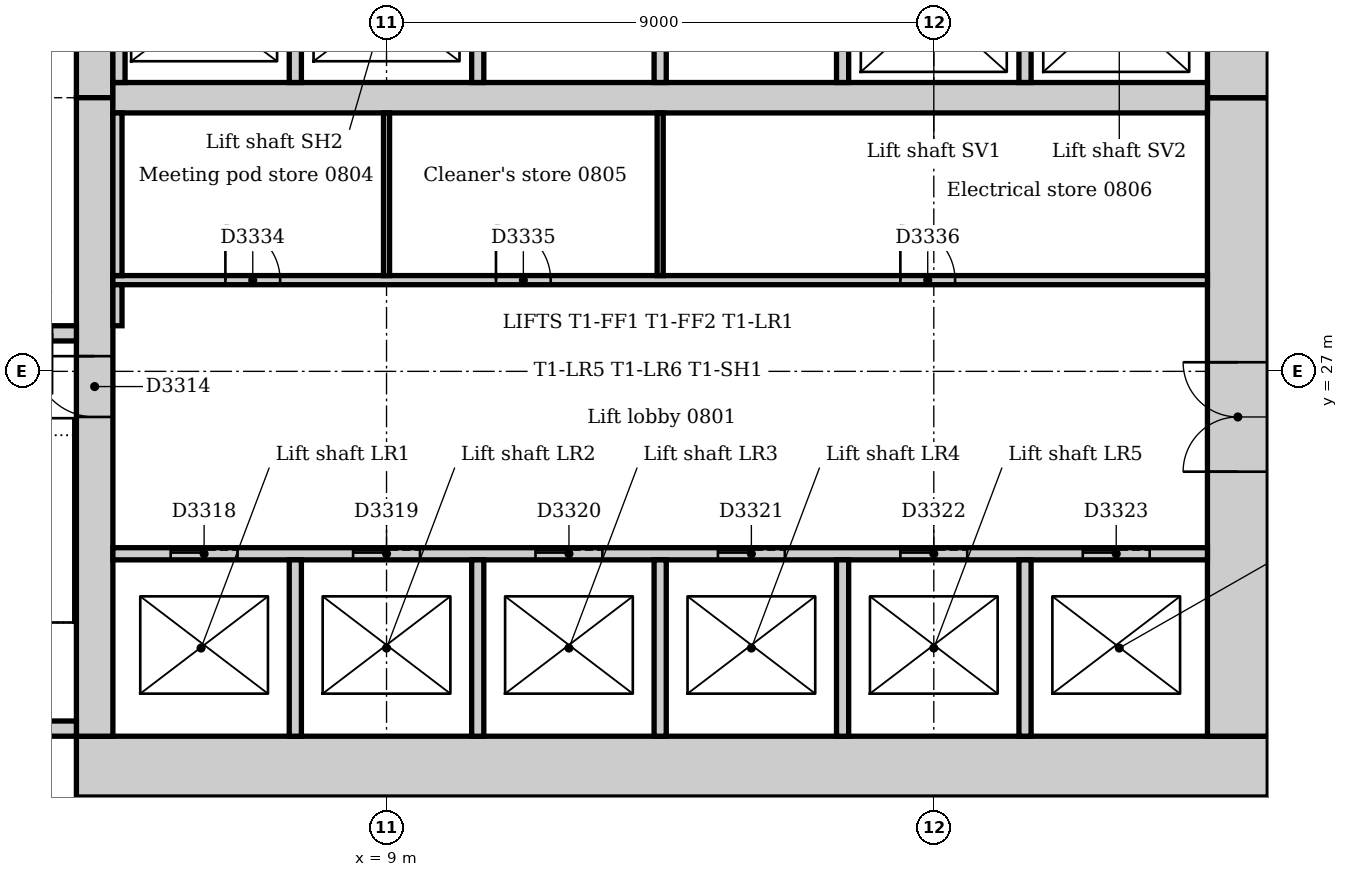
"""IFC4 building model, lengths in metres.
Left out: names, types, materials, properties, quantities, classifications, styles, units other than length and angle.
Written with IfcOpenShell. Run it as: python <this file> out.ifc"""

import sys

from ifc_helpers import new_model, si_unit, direction, frame, frame_2d, origin, place, context, subcontext, project, spatial, rectangle, extrude, element, fill, save


model = new_model("IFC4")
c1 = context("Model", 3, precision=1e-05, world=origin(), true_north=direction((0.0, 1.0)))
c2 = subcontext(c1, "Body", "Model", "MODEL_VIEW")
j1 = project(units=[si_unit("LENGTHUNIT", "METRE"), si_unit("PLANEANGLEUNIT", "RADIAN")], contexts=[c1])
p1 = place(None, origin())
s1 = spatial("IfcSite", under=j1, at=p1, CompositionType="ELEMENT")
p2 = place(p1, origin())
s2 = spatial("IfcBuilding", under=s1, at=p2, CompositionType="ELEMENT")
p3 = place(p2, frame((0.0, 0.0, 38.0)))
s3 = spatial("IfcBuildingStorey", under=s2, at=p3, CompositionType="ELEMENT", Elevation=38.0)
p4 = place(p3, frame((3.9, 20.5, 0.0), z_axis=(0.0, 0.0, 1.0), x_axis=(1.0, 0.0, 0.0)))
e1 = element("IfcWall", 1, at=p4, inside=s3, PredefinedType="SOLIDWALL", context=c2, shape_type="SweptSolid", body=[
    extrude(rectangle(XDim=19.6, YDim=1.0, at=frame_2d((9.8, 0.0))), origin(), (0.0, 0.0, 1.0), 4.0),
])
p5 = place(p3, frame((23.0, 21.0, 0.0), z_axis=(0.0, 0.0, 1.0), x_axis=(0.0, 1.0, 0.0)))
e2 = element("IfcWall", 2, at=p5, inside=s3, PredefinedType="SOLIDWALL", context=c2, shape_type="SweptSolid", body=[
    extrude(rectangle(XDim=10.5, YDim=1.0, at=frame_2d((5.25, 0.0))), origin(), (0.0, 0.0, 1.0), 4.0),
])
p6 = place(p5, frame((4.35, 0.0, 0.0)))
e3 = element("IfcOpeningElement", 3, at=p6, cuts=e2, PredefinedType="OPENING", context=c2, shape_type="SweptSolid", body=[
    extrude(rectangle(XDim=1.8, YDim=2.1, at=frame_2d((0.9, 1.05))), frame((0.0, 0.51, 0.0), z_axis=(0.0, -1.0, 0.0), x_axis=(1.0, 0.0, 0.0)), (0.0, 0.0, 1.0), 1.02),
])
p7 = place(p3, frame((23.0, 31.5, 0.0), z_axis=(0.0, 0.0, 1.0), x_axis=(0.0, 1.0, 0.0)))
e4 = element("IfcWall", 4, at=p7, inside=s3, PredefinedType="SOLIDWALL", context=c2, shape_type="SweptSolid", body=[
    extrude(rectangle(XDim=10.5, YDim=1.0, at=frame_2d((5.25, 0.0))), origin(), (0.0, 0.0, 1.0), 4.0),
])
p8 = place(p7, frame((3.15, 0.0, 0.0)))
e5 = element("IfcOpeningElement", 5, at=p8, cuts=e4, PredefinedType="OPENING", context=c2, shape_type="SweptSolid", body=[
    extrude(rectangle(XDim=1.0, YDim=2.1, at=frame_2d((0.5, 1.05))), frame((0.0, 0.51, 0.0), z_axis=(0.0, -1.0, 0.0), x_axis=(1.0, 0.0, 0.0)), (0.0, 0.0, 1.0), 1.02),
])
p9 = place(p7, frame((5.2, 0.0, 0.0)))
e6 = element("IfcOpeningElement", 6, at=p9, cuts=e4, PredefinedType="OPENING", context=c2, shape_type="SweptSolid", body=[
    extrude(rectangle(XDim=1.0, YDim=2.1, at=frame_2d((0.5, 1.05))), frame((0.0, 0.51, 0.0), z_axis=(0.0, -1.0, 0.0), x_axis=(1.0, 0.0, 0.0)), (0.0, 0.0, 1.0), 1.02),
])
p10 = place(p3, frame((4.2, 42.0, 0.0), z_axis=(0.0, 0.0, 1.0), x_axis=(0.0, -1.0, 0.0)))
e7 = element("IfcWall", 7, at=p10, inside=s3, PredefinedType="SOLIDWALL", context=c2, shape_type="SweptSolid", body=[
    extrude(rectangle(XDim=10.5, YDim=0.6, at=frame_2d((5.25, 0.0))), origin(), (0.0, 0.0, 1.0), 4.0),
])
p11 = place(p10, frame((5.3, 0.0, 0.0)))
e8 = element("IfcOpeningElement", 8, at=p11, cuts=e7, PredefinedType="OPENING", context=c2, shape_type="SweptSolid", body=[
    extrude(rectangle(XDim=1.0, YDim=2.1, at=frame_2d((0.5, 1.05))), frame((0.0, 0.31, 0.0), z_axis=(0.0, -1.0, 0.0), x_axis=(1.0, 0.0, 0.0)), (0.0, 0.0, 1.0), 0.62),
])
p12 = place(p3, frame((4.2, 31.5, 0.0), z_axis=(0.0, 0.0, 1.0), x_axis=(0.0, -1.0, 0.0)))
e9 = element("IfcWall", 9, at=p12, inside=s3, PredefinedType="SOLIDWALL", context=c2, shape_type="SweptSolid", body=[
    extrude(rectangle(XDim=10.5, YDim=0.6, at=frame_2d((5.25, 0.0))), origin(), (0.0, 0.0, 1.0), 4.0),
])
p13 = place(p12, frame((4.25, 0.0, 0.0)))
e10 = element("IfcOpeningElement", 10, at=p13, cuts=e9, PredefinedType="OPENING", context=c2, shape_type="SweptSolid", body=[
    extrude(rectangle(XDim=1.0, YDim=2.1, at=frame_2d((0.5, 1.05))), frame((0.0, 0.31, 0.0), z_axis=(0.0, -1.0, 0.0), x_axis=(1.0, 0.0, 0.0)), (0.0, 0.0, 1.0), 0.62),
])
p14 = place(p3, frame((4.5, 31.5, 0.0), z_axis=(0.0, 0.0, 1.0), x_axis=(1.0, 0.0, 0.0)))
e11 = element("IfcWall", 11, at=p14, inside=s3, PredefinedType="SOLIDWALL", context=c2, shape_type="SweptSolid", body=[
    extrude(rectangle(XDim=18.0, YDim=0.5, at=frame_2d((9.0, 0.0))), origin(), (0.0, 0.0, 1.0), 4.0),
])
p15 = place(p3, frame((0.36, 21.125, 0.0), z_axis=(0.0, 0.0, 1.0), x_axis=(1.0, 0.0, 0.0)))
e12 = element("IfcWall", 12, at=p15, inside=s3, PredefinedType="SOLIDWALL", context=c2, shape_type="SweptSolid", body=[
    extrude(rectangle(XDim=3.54, YDim=0.25, at=frame_2d((1.77, 0.0))), origin(), (0.0, 0.0, 1.0), 4.0),
])
p16 = place(p3, frame((3.9, 27.625, 0.0), z_axis=(0.0, 0.0, 1.0), x_axis=(-1.0, 0.0, 0.0)))
e13 = element("IfcWall", 13, at=p16, inside=s3, PredefinedType="SOLIDWALL", context=c2, shape_type="SweptSolid", body=[
    extrude(rectangle(XDim=3.54, YDim=0.25, at=frame_2d((1.77, 0.0))), origin(), (0.0, 0.0, 1.0), 4.0),
])
p17 = place(p16, frame((0.4, 0.0, 0.0)))
e14 = element("IfcOpeningElement", 14, at=p17, cuts=e13, PredefinedType="OPENING", context=c2, shape_type="SweptSolid", body=[
    extrude(rectangle(XDim=1.0, YDim=2.1, at=frame_2d((0.5, 1.05))), frame((0.0, 0.135, 0.0), z_axis=(0.0, -1.0, 0.0), x_axis=(1.0, 0.0, 0.0)), (0.0, 0.0, 1.0), 0.27),
])
p18 = place(p3, frame((4.5, 24.0, 0.0), z_axis=(0.0, 0.0, 1.0), x_axis=(1.0, 0.0, 0.0)))
e15 = element("IfcWall", 15, at=p18, inside=s3, PredefinedType="PARTITIONING", context=c2, shape_type="SweptSolid", body=[
    extrude(rectangle(XDim=18.0, YDim=0.2, at=frame_2d((9.0, 0.0))), origin(), (0.0, 0.0, 1.0), 3.85),
])
p19 = place(p18, frame((0.95, 0.0, 0.0)))
e16 = element("IfcOpeningElement", 16, at=p19, cuts=e15, PredefinedType="OPENING", context=c2, shape_type="SweptSolid", body=[
    extrude(rectangle(XDim=1.1, YDim=2.1, at=frame_2d((0.55, 1.05))), frame((0.0, 0.11, 0.0), z_axis=(0.0, -1.0, 0.0), x_axis=(1.0, 0.0, 0.0)), (0.0, 0.0, 1.0), 0.22),
])
p20 = place(p18, frame((3.95, 0.0, 0.0)))
e17 = element("IfcOpeningElement", 17, at=p20, cuts=e15, PredefinedType="OPENING", context=c2, shape_type="SweptSolid", body=[
    extrude(rectangle(XDim=1.1, YDim=2.1, at=frame_2d((0.55, 1.05))), frame((0.0, 0.11, 0.0), z_axis=(0.0, -1.0, 0.0), x_axis=(1.0, 0.0, 0.0)), (0.0, 0.0, 1.0), 0.22),
])
p21 = place(p18, frame((6.95, 0.0, 0.0)))
e18 = element("IfcOpeningElement", 18, at=p21, cuts=e15, PredefinedType="OPENING", context=c2, shape_type="SweptSolid", body=[
    extrude(rectangle(XDim=1.1, YDim=2.1, at=frame_2d((0.55, 1.05))), frame((0.0, 0.11, 0.0), z_axis=(0.0, -1.0, 0.0), x_axis=(1.0, 0.0, 0.0)), (0.0, 0.0, 1.0), 0.22),
])
p22 = place(p18, frame((9.95, 0.0, 0.0)))
e19 = element("IfcOpeningElement", 19, at=p22, cuts=e15, PredefinedType="OPENING", context=c2, shape_type="SweptSolid", body=[
    extrude(rectangle(XDim=1.1, YDim=2.1, at=frame_2d((0.55, 1.05))), frame((0.0, 0.11, 0.0), z_axis=(0.0, -1.0, 0.0), x_axis=(1.0, 0.0, 0.0)), (0.0, 0.0, 1.0), 0.22),
])
p23 = place(p18, frame((12.95, 0.0, 0.0)))
e20 = element("IfcOpeningElement", 20, at=p23, cuts=e15, PredefinedType="OPENING", context=c2, shape_type="SweptSolid", body=[
    extrude(rectangle(XDim=1.1, YDim=2.1, at=frame_2d((0.55, 1.05))), frame((0.0, 0.11, 0.0), z_axis=(0.0, -1.0, 0.0), x_axis=(1.0, 0.0, 0.0)), (0.0, 0.0, 1.0), 0.22),
])
p24 = place(p18, frame((15.95, 0.0, 0.0)))
e21 = element("IfcOpeningElement", 21, at=p24, cuts=e15, PredefinedType="OPENING", context=c2, shape_type="SweptSolid", body=[
    extrude(rectangle(XDim=1.1, YDim=2.1, at=frame_2d((0.55, 1.05))), frame((0.0, 0.11, 0.0), z_axis=(0.0, -1.0, 0.0), x_axis=(1.0, 0.0, 0.0)), (0.0, 0.0, 1.0), 0.22),
])
p25 = place(p3, frame((4.6, 31.75, 0.0), z_axis=(0.0, 0.0, 1.0), x_axis=(0.0, 1.0, 0.0)))
e22 = element("IfcWall", 22, at=p25, inside=s3, PredefinedType="PARTITIONING", context=c2, shape_type="SweptSolid", body=[
    extrude(rectangle(XDim=2.65, YDim=0.2, at=frame_2d((1.325, 0.0))), origin(), (0.0, 0.0, 1.0), 3.85),
])
p26 = place(p3, frame((7.5, 21.0, 0.0), z_axis=(0.0, 0.0, 1.0), x_axis=(0.0, 1.0, 0.0)))
e23 = element("IfcWall", 23, at=p26, inside=s3, PredefinedType="PARTITIONING", context=c2, shape_type="SweptSolid", body=[
    extrude(rectangle(XDim=2.9, YDim=0.2, at=frame_2d((1.45, 0.0))), origin(), (0.0, 0.0, 1.0), 3.85),
])
p27 = place(p3, frame((7.5, 31.75, 0.0), z_axis=(0.0, 0.0, 1.0), x_axis=(0.0, 1.0, 0.0)))
e24 = element("IfcWall", 24, at=p27, inside=s3, PredefinedType="PARTITIONING", context=c2, shape_type="SweptSolid", body=[
    extrude(rectangle(XDim=2.65, YDim=0.2, at=frame_2d((1.325, 0.0))), origin(), (0.0, 0.0, 1.0), 3.85),
])
p28 = place(p3, frame((10.5, 21.0, 0.0), z_axis=(0.0, 0.0, 1.0), x_axis=(0.0, 1.0, 0.0)))
e25 = element("IfcWall", 25, at=p28, inside=s3, PredefinedType="PARTITIONING", context=c2, shape_type="SweptSolid", body=[
    extrude(rectangle(XDim=2.9, YDim=0.2, at=frame_2d((1.45, 0.0))), origin(), (0.0, 0.0, 1.0), 3.85),
])
p29 = place(p3, frame((10.5, 31.75, 0.0), z_axis=(0.0, 0.0, 1.0), x_axis=(0.0, 1.0, 0.0)))
e26 = element("IfcWall", 26, at=p29, inside=s3, PredefinedType="PARTITIONING", context=c2, shape_type="SweptSolid", body=[
    extrude(rectangle(XDim=2.65, YDim=0.2, at=frame_2d((1.325, 0.0))), origin(), (0.0, 0.0, 1.0), 3.85),
])
p30 = place(p3, frame((13.5, 21.0, 0.0), z_axis=(0.0, 0.0, 1.0), x_axis=(0.0, 1.0, 0.0)))
e27 = element("IfcWall", 27, at=p30, inside=s3, PredefinedType="PARTITIONING", context=c2, shape_type="SweptSolid", body=[
    extrude(rectangle(XDim=2.9, YDim=0.2, at=frame_2d((1.45, 0.0))), origin(), (0.0, 0.0, 1.0), 3.85),
])
p31 = place(p3, frame((13.5, 31.75, 0.0), z_axis=(0.0, 0.0, 1.0), x_axis=(0.0, 1.0, 0.0)))
e28 = element("IfcWall", 28, at=p31, inside=s3, PredefinedType="PARTITIONING", context=c2, shape_type="SweptSolid", body=[
    extrude(rectangle(XDim=2.65, YDim=0.2, at=frame_2d((1.325, 0.0))), origin(), (0.0, 0.0, 1.0), 3.85),
])
p32 = place(p3, frame((16.5, 21.0, 0.0), z_axis=(0.0, 0.0, 1.0), x_axis=(0.0, 1.0, 0.0)))
e29 = element("IfcWall", 29, at=p32, inside=s3, PredefinedType="PARTITIONING", context=c2, shape_type="SweptSolid", body=[
    extrude(rectangle(XDim=2.9, YDim=0.2, at=frame_2d((1.45, 0.0))), origin(), (0.0, 0.0, 1.0), 3.85),
])
p33 = place(p3, frame((16.5, 31.75, 0.0), z_axis=(0.0, 0.0, 1.0), x_axis=(0.0, 1.0, 0.0)))
e30 = element("IfcWall", 30, at=p33, inside=s3, PredefinedType="PARTITIONING", context=c2, shape_type="SweptSolid", body=[
    extrude(rectangle(XDim=2.65, YDim=0.2, at=frame_2d((1.325, 0.0))), origin(), (0.0, 0.0, 1.0), 3.85),
])
p34 = place(p3, frame((19.5, 21.0, 0.0), z_axis=(0.0, 0.0, 1.0), x_axis=(0.0, 1.0, 0.0)))
e31 = element("IfcWall", 31, at=p34, inside=s3, PredefinedType="PARTITIONING", context=c2, shape_type="SweptSolid", body=[
    extrude(rectangle(XDim=2.9, YDim=0.2, at=frame_2d((1.45, 0.0))), origin(), (0.0, 0.0, 1.0), 3.85),
])
p35 = place(p3, frame((19.5, 31.75, 0.0), z_axis=(0.0, 0.0, 1.0), x_axis=(0.0, 1.0, 0.0)))
e32 = element("IfcWall", 32, at=p35, inside=s3, PredefinedType="PARTITIONING", context=c2, shape_type="SweptSolid", body=[
    extrude(rectangle(XDim=2.65, YDim=0.2, at=frame_2d((1.325, 0.0))), origin(), (0.0, 0.0, 1.0), 3.85),
])
p36 = place(p3, frame((4.5, 28.5, 0.0), z_axis=(0.0, 0.0, 1.0), x_axis=(1.0, 0.0, 0.0)))
e33 = element("IfcWall", 33, at=p36, inside=s3, PredefinedType="PARTITIONING", context=c2, shape_type="SweptSolid", body=[
    extrude(rectangle(XDim=18.0, YDim=0.15, at=frame_2d((9.0, 0.0))), origin(), (0.0, 0.0, 1.0), 3.85),
])
p37 = place(p36, frame((1.85, 0.0, 0.0)))
e34 = element("IfcOpeningElement", 34, at=p37, cuts=e33, PredefinedType="OPENING", context=c2, shape_type="SweptSolid", body=[
    extrude(rectangle(XDim=0.9, YDim=2.1, at=frame_2d((0.45, 1.05))), frame((0.0, 0.085, 0.0), z_axis=(0.0, -1.0, 0.0), x_axis=(1.0, 0.0, 0.0)), (0.0, 0.0, 1.0), 0.17),
])
p38 = place(p36, frame((6.3, 0.0, 0.0)))
e35 = element("IfcOpeningElement", 35, at=p38, cuts=e33, PredefinedType="OPENING", context=c2, shape_type="SweptSolid", body=[
    extrude(rectangle(XDim=0.9, YDim=2.1, at=frame_2d((0.45, 1.05))), frame((0.0, 0.085, 0.0), z_axis=(0.0, -1.0, 0.0), x_axis=(1.0, 0.0, 0.0)), (0.0, 0.0, 1.0), 0.17),
])
p39 = place(p36, frame((12.95, 0.0, 0.0)))
e36 = element("IfcOpeningElement", 36, at=p39, cuts=e33, PredefinedType="OPENING", context=c2, shape_type="SweptSolid", body=[
    extrude(rectangle(XDim=0.9, YDim=2.1, at=frame_2d((0.45, 1.05))), frame((0.0, 0.085, 0.0), z_axis=(0.0, -1.0, 0.0), x_axis=(1.0, 0.0, 0.0)), (0.0, 0.0, 1.0), 0.17),
])
p40 = place(p3, frame((4.575, 27.75, 0.0), z_axis=(0.0, 0.0, 1.0), x_axis=(0.0, 1.0, 0.0)))
e37 = element("IfcWall", 37, at=p40, inside=s3, PredefinedType="PARTITIONING", context=c2, shape_type="SweptSolid", body=[
    extrude(rectangle(XDim=0.675, YDim=0.15, at=frame_2d((0.338, 0.0))), origin(), (0.0, 0.0, 1.0), 3.85),
])
p41 = place(p3, frame((4.575, 28.575, 0.0), z_axis=(0.0, 0.0, 1.0), x_axis=(0.0, 1.0, 0.0)))
e38 = element("IfcWall", 38, at=p41, inside=s3, PredefinedType="PARTITIONING", context=c2, shape_type="SweptSolid", body=[
    extrude(rectangle(XDim=2.675, YDim=0.15, at=frame_2d((1.337, 0.0))), origin(), (0.0, 0.0, 1.0), 3.85),
])
for number, where, z_axis, x_axis in (
    (39, (9.0, 28.575, 0.0), (0.0, 0.0, 1.0), (0.0, 1.0, 0.0)),
    (40, (13.5, 28.575, 0.0), (0.0, 0.0, 1.0), (0.0, 1.0, 0.0)),
):
    element("IfcWall", number, at=place(p3, frame(where, z_axis=z_axis, x_axis=x_axis)), inside=s3, PredefinedType="PARTITIONING", context=c2, shape_type="SweptSolid", body=[
        extrude(rectangle(XDim=2.675, YDim=0.1, at=frame_2d((1.337, 0.0))), origin(), (0.0, 0.0, 1.0), 3.85),
    ])
p42 = place(p13, frame((1.0, 0.0, 0.0), z_axis=(0.0, 0.0, 1.0), x_axis=(-1.0, 0.0, 0.0)))
e41 = element("IfcDoor", 41, at=p42, inside=s3, OperationType="SINGLE_SWING_RIGHT", PredefinedType="DOOR", context=c2, shape_type="SweptSolid", body=[
    extrude(rectangle(XDim=1.0, YDim=2.1, at=frame_2d((0.5, 1.05))), frame((0.0, 0.025, 0.0), z_axis=(0.0, -1.0, 0.0), x_axis=(1.0, 0.0, 0.0)), (0.0, 0.0, 1.0), 0.05),
])
fill(e10, e41)
p43 = place(p19, origin())
e42 = element("IfcDoor", 42, at=p43, inside=s3, OperationType="SLIDING_TO_LEFT", PredefinedType="DOOR", context=c2, shape_type="SweptSolid", body=[
    extrude(rectangle(XDim=1.1, YDim=2.1, at=frame_2d((0.55, 1.05))), frame((0.0, 0.025, 0.0), z_axis=(0.0, -1.0, 0.0), x_axis=(1.0, 0.0, 0.0)), (0.0, 0.0, 1.0), 0.05),
])
fill(e16, e42)
p44 = place(p20, origin())
e43 = element("IfcDoor", 43, at=p44, inside=s3, OperationType="SLIDING_TO_LEFT", PredefinedType="DOOR", context=c2, shape_type="SweptSolid", body=[
    extrude(rectangle(XDim=1.1, YDim=2.1, at=frame_2d((0.55, 1.05))), frame((0.0, 0.025, 0.0), z_axis=(0.0, -1.0, 0.0), x_axis=(1.0, 0.0, 0.0)), (0.0, 0.0, 1.0), 0.05),
])
fill(e17, e43)
p45 = place(p21, origin())
e44 = element("IfcDoor", 44, at=p45, inside=s3, OperationType="SLIDING_TO_LEFT", PredefinedType="DOOR", context=c2, shape_type="SweptSolid", body=[
    extrude(rectangle(XDim=1.1, YDim=2.1, at=frame_2d((0.55, 1.05))), frame((0.0, 0.025, 0.0), z_axis=(0.0, -1.0, 0.0), x_axis=(1.0, 0.0, 0.0)), (0.0, 0.0, 1.0), 0.05),
])
fill(e18, e44)
p46 = place(p22, origin())
e45 = element("IfcDoor", 45, at=p46, inside=s3, OperationType="SLIDING_TO_LEFT", PredefinedType="DOOR", context=c2, shape_type="SweptSolid", body=[
    extrude(rectangle(XDim=1.1, YDim=2.1, at=frame_2d((0.55, 1.05))), frame((0.0, 0.025, 0.0), z_axis=(0.0, -1.0, 0.0), x_axis=(1.0, 0.0, 0.0)), (0.0, 0.0, 1.0), 0.05),
])
fill(e19, e45)
p47 = place(p23, origin())
e46 = element("IfcDoor", 46, at=p47, inside=s3, OperationType="SLIDING_TO_LEFT", PredefinedType="DOOR", context=c2, shape_type="SweptSolid", body=[
    extrude(rectangle(XDim=1.1, YDim=2.1, at=frame_2d((0.55, 1.05))), frame((0.0, 0.025, 0.0), z_axis=(0.0, -1.0, 0.0), x_axis=(1.0, 0.0, 0.0)), (0.0, 0.0, 1.0), 0.05),
])
fill(e20, e46)
p48 = place(p24, origin())
e47 = element("IfcDoor", 47, at=p48, inside=s3, OperationType="SLIDING_TO_LEFT", PredefinedType="DOOR", context=c2, shape_type="SweptSolid", body=[
    extrude(rectangle(XDim=1.1, YDim=2.1, at=frame_2d((0.55, 1.05))), frame((0.0, 0.025, 0.0), z_axis=(0.0, -1.0, 0.0), x_axis=(1.0, 0.0, 0.0)), (0.0, 0.0, 1.0), 0.05),
])
fill(e21, e47)
p49 = place(p6, origin())
e48 = element("IfcDoor", 48, at=p49, inside=s3, OperationType="DOUBLE_DOOR_DOUBLE_SWING", PredefinedType="DOOR", context=c2, shape_type="SweptSolid", body=[
    extrude(rectangle(XDim=1.8, YDim=2.1, at=frame_2d((0.9, 1.05))), frame((0.0, 0.025, 0.0), z_axis=(0.0, -1.0, 0.0), x_axis=(1.0, 0.0, 0.0)), (0.0, 0.0, 1.0), 0.05),
])
fill(e3, e48)
p50 = place(p37, origin())
e49 = element("IfcDoor", 49, at=p50, inside=s3, OperationType="SINGLE_SWING_LEFT", PredefinedType="DOOR", context=c2, shape_type="SweptSolid", body=[
    extrude(rectangle(XDim=0.9, YDim=2.1, at=frame_2d((0.45, 1.05))), frame((0.0, 0.025, 0.0), z_axis=(0.0, -1.0, 0.0), x_axis=(1.0, 0.0, 0.0)), (0.0, 0.0, 1.0), 0.05),
])
fill(e34, e49)
p51 = place(p38, origin())
e50 = element("IfcDoor", 50, at=p51, inside=s3, OperationType="SINGLE_SWING_LEFT", PredefinedType="DOOR", context=c2, shape_type="SweptSolid", body=[
    extrude(rectangle(XDim=0.9, YDim=2.1, at=frame_2d((0.45, 1.05))), frame((0.0, 0.025, 0.0), z_axis=(0.0, -1.0, 0.0), x_axis=(1.0, 0.0, 0.0)), (0.0, 0.0, 1.0), 0.05),
])
fill(e35, e50)
p52 = place(p39, origin())
e51 = element("IfcDoor", 51, at=p52, inside=s3, OperationType="SINGLE_SWING_LEFT", PredefinedType="DOOR", context=c2, shape_type="SweptSolid", body=[
    extrude(rectangle(XDim=0.9, YDim=2.1, at=frame_2d((0.45, 1.05))), frame((0.0, 0.025, 0.0), z_axis=(0.0, -1.0, 0.0), x_axis=(1.0, 0.0, 0.0)), (0.0, 0.0, 1.0), 0.05),
])
fill(e36, e51)
save(model, sys.argv[1])
